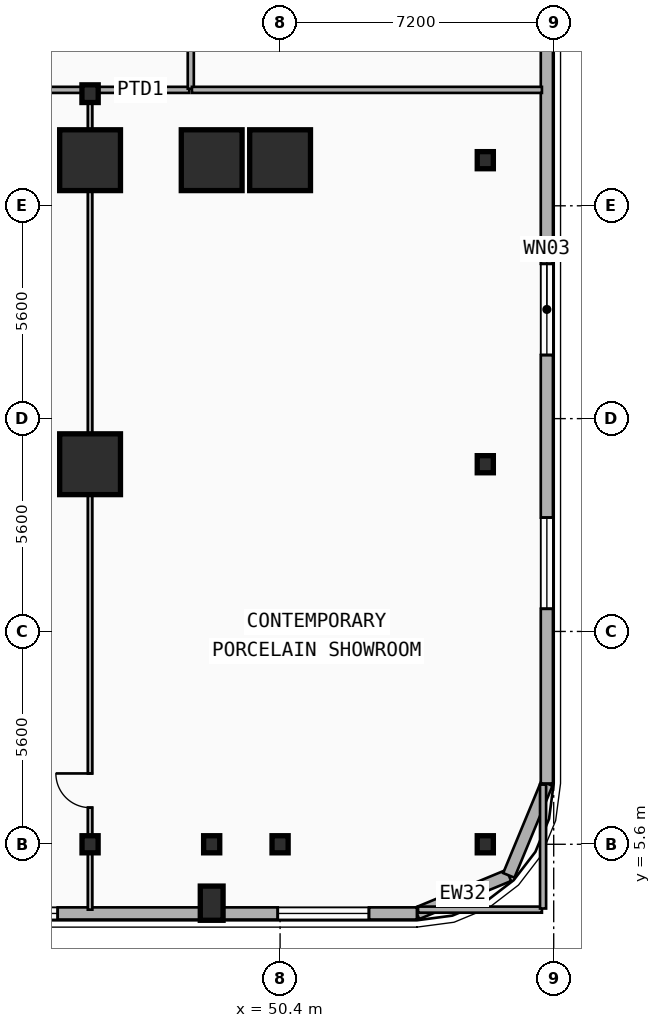
"""IFC4 building model, lengths in metres.
Left out: names, types, materials, properties, quantities, classifications, styles, units other than length and angle.
Written with IfcOpenShell. Run it as: python <this file> out.ifc"""

import sys

from ifc_helpers import new_model, si_unit, direction, frame, frame_2d, origin, origin_2d, place, context, subcontext, project, spatial, rectangle, i_section, extrude, element, fill, save


model = new_model("IFC4")
c1 = context("Model", 3, precision=1e-05, world=origin(), true_north=direction((0.0, 1.0)))
c2 = subcontext(c1, "Body", "Model", "MODEL_VIEW")
j1 = project(units=[si_unit("LENGTHUNIT", "METRE"), si_unit("PLANEANGLEUNIT", "RADIAN")], contexts=[c1])
p1 = place(None, origin())
s1 = spatial("IfcSite", under=j1, at=p1, CompositionType="ELEMENT")
p2 = place(p1, origin())
s2 = spatial("IfcBuilding", under=s1, at=p2, CompositionType="ELEMENT")
p3 = place(p2, frame((0.0, 0.0, 10.4)))
s3 = spatial("IfcBuildingStorey", under=s2, at=p3, CompositionType="ELEMENT", Elevation=10.4)
p4 = place(p3, frame((45.4, 25.35, 0.0), z_axis=(0.0, 0.0, 1.0), x_axis=(1.0, 0.0, 0.0)))
e1 = element("IfcColumn", 1, at=p4, inside=s3, PredefinedType="COLUMN", context=c2, shape_type="SweptSolid", body=[
    extrude(i_section(OverallWidth=0.428, OverallDepth=0.465, WebThickness=0.045, FlangeThickness=0.073, FilletRadius=0.015, at=origin_2d()), origin(), (0.0, 0.0, 1.0), 4.5),
])
p5 = place(p3, frame((45.4, 5.6, 0.0), z_axis=(0.0, 0.0, 1.0), x_axis=(1.0, 0.0, 0.0)))
e2 = element("IfcColumn", 2, at=p5, inside=s3, PredefinedType="COLUMN", context=c2, shape_type="SweptSolid", body=[
    extrude(i_section(OverallWidth=0.424, OverallDepth=0.45, WebThickness=0.041, FlangeThickness=0.065, FilletRadius=0.015, at=origin_2d()), origin(), (0.0, 0.0, 1.0), 4.5),
])
for number, where, z_axis, x_axis in (
    (3, (45.4, 15.6, 0.0), (0.0, 0.0, 1.0), (1.0, 0.0, 0.0)),
    (4, (45.4, 23.6, 0.0), (0.0, 0.0, 1.0), (1.0, 0.0, 0.0)),
):
    element("IfcColumn", number, at=place(p3, frame(where, z_axis=z_axis, x_axis=x_axis)), inside=s3, PredefinedType="COLUMN", context=c2, shape_type="SweptSolid", body=[
        extrude(rectangle(XDim=1.6, YDim=1.6, at=origin_2d()), origin(), (0.0, 0.0, 1.0), 4.5),
    ])
p6 = place(p3, frame((48.6, 5.6, 0.0), z_axis=(0.0, 0.0, 1.0), x_axis=(1.0, 0.0, 0.0)))
e5 = element("IfcColumn", 5, at=p6, inside=s3, PredefinedType="COLUMN", context=c2, shape_type="SweptSolid", body=[
    extrude(i_section(OverallWidth=0.424, OverallDepth=0.45, WebThickness=0.041, FlangeThickness=0.065, FilletRadius=0.015, at=origin_2d()), origin(), (0.0, 0.0, 1.0), 4.5),
])
p7 = place(p3, frame((48.6, 23.6, 0.0), z_axis=(0.0, 0.0, 1.0), x_axis=(1.0, 0.0, 0.0)))
e6 = element("IfcColumn", 6, at=p7, inside=s3, PredefinedType="COLUMN", context=c2, shape_type="SweptSolid", body=[
    extrude(rectangle(XDim=1.6, YDim=1.6, at=origin_2d()), origin(), (0.0, 0.0, 1.0), 4.5),
])
p8 = place(p3, frame((50.4, 5.6, 0.0), z_axis=(0.0, 0.0, 1.0), x_axis=(1.0, 0.0, 0.0)))
e7 = element("IfcColumn", 7, at=p8, inside=s3, PredefinedType="COLUMN", context=c2, shape_type="SweptSolid", body=[
    extrude(i_section(OverallWidth=0.424, OverallDepth=0.45, WebThickness=0.041, FlangeThickness=0.065, FilletRadius=0.015, at=origin_2d()), origin(), (0.0, 0.0, 1.0), 4.5),
])
p9 = place(p3, frame((50.4, 23.6, 0.0), z_axis=(0.0, 0.0, 1.0), x_axis=(1.0, 0.0, 0.0)))
e8 = element("IfcColumn", 8, at=p9, inside=s3, PredefinedType="COLUMN", context=c2, shape_type="SweptSolid", body=[
    extrude(rectangle(XDim=1.6, YDim=1.6, at=origin_2d()), origin(), (0.0, 0.0, 1.0), 4.5),
])
for number, where, z_axis, x_axis in (
    (9, (55.8, 5.6, 0.0), (0.0, 0.0, 1.0), (1.0, 0.0, 0.0)),
    (10, (55.8, 15.6, 0.0), (0.0, 0.0, 1.0), (1.0, 0.0, 0.0)),
    (11, (55.8, 23.6, 0.0), (0.0, 0.0, 1.0), (1.0, 0.0, 0.0)),
):
    element("IfcColumn", number, at=place(p3, frame(where, z_axis=z_axis, x_axis=x_axis)), inside=s3, PredefinedType="COLUMN", context=c2, shape_type="SweptSolid", body=[
        extrude(i_section(OverallWidth=0.424, OverallDepth=0.45, WebThickness=0.041, FlangeThickness=0.065, FilletRadius=0.015, at=origin_2d()), origin(), (0.0, 0.0, 1.0), 4.5),
    ])
p10 = place(p3, frame((48.6, 4.05, 0.0), z_axis=(0.0, 0.0, 1.0), x_axis=(1.0, 0.0, 0.0)))
e12 = element("IfcColumn", 12, at=p10, inside=s3, PredefinedType="PILASTER", context=c2, shape_type="SweptSolid", body=[
    extrude(rectangle(XDim=0.6, YDim=0.9, at=origin_2d()), origin(), (0.0, 0.0, 1.0), 4.5),
])
for number, where, z_axis, x_axis in (
    (13, (56.418, 4.782, 0.0), (0.0, 0.0, 1.0), (-0.924, -0.383, 0.0)),
    (14, (57.42, 7.2, 0.0), (0.0, 0.0, 1.0), (-0.383, -0.924, 0.0)),
):
    element("IfcWall", number, at=place(p3, frame(where, z_axis=z_axis, x_axis=x_axis)), inside=s3, PredefinedType="SOLIDWALL", context=c2, shape_type="SweptSolid", body=[
        extrude(rectangle(XDim=2.617, YDim=0.32, at=frame_2d((1.309, 0.0))), origin(), (0.0, 0.0, 1.0), 4.2),
    ])
p11 = place(p3, frame((57.42, 41.6, 0.0), z_axis=(0.0, 0.0, 1.0), x_axis=(0.0, -1.0, 0.0)))
e15 = element("IfcWall", 15, at=p11, inside=s3, PredefinedType="SOLIDWALL", context=c2, shape_type="SweptSolid", body=[
    extrude(rectangle(XDim=34.4, YDim=0.32, at=frame_2d((17.2, 0.0))), origin(), (0.0, 0.0, 1.0), 4.2),
])
p12 = place(p11, frame((20.727, 0.0, 0.9)))
e16 = element("IfcOpeningElement", 16, at=p12, cuts=e15, PredefinedType="OPENING", context=c2, shape_type="SweptSolid", body=[
    extrude(rectangle(XDim=2.4, YDim=1.8, at=frame_2d((1.2, 0.9))), frame((0.0, 0.17, 0.0), z_axis=(0.0, -1.0, 0.0), x_axis=(1.0, 0.0, 0.0)), (0.0, 0.0, 1.0), 0.34),
])
p13 = place(p11, frame((27.403, 0.0, 0.9)))
e17 = element("IfcOpeningElement", 17, at=p13, cuts=e15, PredefinedType="OPENING", context=c2, shape_type="SweptSolid", body=[
    extrude(rectangle(XDim=2.4, YDim=1.8, at=frame_2d((1.2, 0.9))), frame((0.0, 0.17, 0.0), z_axis=(0.0, -1.0, 0.0), x_axis=(1.0, 0.0, 0.0)), (0.0, 0.0, 1.0), 0.34),
])
p14 = place(p3, frame((54.0, 3.78, 0.0), z_axis=(0.0, 0.0, 1.0), x_axis=(-1.0, 0.0, 0.0)))
e18 = element("IfcWall", 18, at=p14, inside=s3, PredefinedType="SOLIDWALL", context=c2, shape_type="SweptSolid", body=[
    extrude(rectangle(XDim=16.95, YDim=0.32, at=frame_2d((8.475, 0.0))), origin(), (0.0, 0.0, 1.0), 4.2),
])
p15 = place(p14, frame((9.452, 0.0, 0.9)))
e19 = element("IfcOpeningElement", 19, at=p15, cuts=e18, PredefinedType="OPENING", context=c2, shape_type="SweptSolid", body=[
    extrude(rectangle(XDim=2.4, YDim=1.8, at=frame_2d((1.2, 0.9))), frame((0.0, 0.17, 0.0), z_axis=(0.0, -1.0, 0.0), x_axis=(1.0, 0.0, 0.0)), (0.0, 0.0, 1.0), 0.34),
])
p16 = place(p14, frame((1.262, 0.0, 0.9)))
e20 = element("IfcOpeningElement", 20, at=p16, cuts=e18, PredefinedType="OPENING", context=c2, shape_type="SweptSolid", body=[
    extrude(rectangle(XDim=2.4, YDim=1.8, at=frame_2d((1.2, 0.9))), frame((0.0, 0.17, 0.0), z_axis=(0.0, -1.0, 0.0), x_axis=(1.0, 0.0, 0.0)), (0.0, 0.0, 1.0), 0.34),
])
p17 = place(p3, frame((36.39, 25.45, 0.0), z_axis=(0.0, 0.0, 1.0), x_axis=(1.0, 0.0, 0.0)))
e21 = element("IfcWall", 21, at=p17, inside=s3, PredefinedType="PARTITIONING", context=c2, shape_type="SweptSolid", body=[
    extrude(rectangle(XDim=8.97, YDim=0.16, at=frame_2d((4.485, 0.0))), origin(), (0.0, 0.0, 1.0), 3.366),
])
p18 = place(p17, frame((3.985, 0.0, 0.0)))
e22 = element("IfcOpeningElement", 22, at=p18, cuts=e21, PredefinedType="OPENING", context=c2, shape_type="SweptSolid", body=[
    extrude(rectangle(XDim=1.0, YDim=2.15, at=frame_2d((0.5, 1.075))), frame((0.0, 0.09, 0.0), z_axis=(0.0, -1.0, 0.0), x_axis=(1.0, 0.0, 0.0)), (0.0, 0.0, 1.0), 0.18),
])
p19 = place(p3, frame((45.44, 25.45, 0.0), z_axis=(0.0, 0.0, 1.0), x_axis=(1.0, 0.0, 0.0)))
e23 = element("IfcWall", 23, at=p19, inside=s3, PredefinedType="PARTITIONING", context=c2, shape_type="SweptSolid", body=[
    extrude(rectangle(XDim=2.57, YDim=0.16, at=frame_2d((1.285, 0.0))), origin(), (0.0, 0.0, 1.0), 3.366),
])
p20 = place(p3, frame((45.4, 3.88, 0.0), z_axis=(0.0, 0.0, 1.0), x_axis=(0.0, 1.0, 0.0)))
e24 = element("IfcWall", 24, at=p20, inside=s3, PredefinedType="PARTITIONING", context=c2, shape_type="SweptSolid", body=[
    extrude(rectangle(XDim=21.53, YDim=0.12, at=frame_2d((10.765, 0.0))), origin(), (0.0, 0.0, 1.0), 3.172),
])
p21 = place(p20, frame((2.684, 0.0, 0.0)))
e25 = element("IfcOpeningElement", 25, at=p21, cuts=e24, PredefinedType="OPENING", context=c2, shape_type="SweptSolid", body=[
    extrude(rectangle(XDim=0.9, YDim=2.1, at=frame_2d((0.45, 1.05))), frame((0.0, 0.07, 0.0), z_axis=(0.0, -1.0, 0.0), x_axis=(1.0, 0.0, 0.0)), (0.0, 0.0, 1.0), 0.14),
])
p22 = place(p3, frame((48.05, 25.48, 0.0), z_axis=(0.0, 0.0, 1.0), x_axis=(0.0, 1.0, 0.0)))
e26 = element("IfcWall", 26, at=p22, inside=s3, PredefinedType="PARTITIONING", context=c2, shape_type="SweptSolid", body=[
    extrude(rectangle(XDim=2.09, YDim=0.16, at=frame_2d((1.045, 0.0))), origin(), (0.0, 0.0, 1.0), 4.2),
])
p23 = place(p3, frame((54.03, 3.88, 0.0), z_axis=(0.0, 0.0, 1.0), x_axis=(1.0, 0.0, 0.0)))
e27 = element("IfcWall", 27, at=p23, inside=s3, PredefinedType="PARTITIONING", context=c2, shape_type="SweptSolid", body=[
    extrude(rectangle(XDim=3.26, YDim=0.16, at=frame_2d((1.63, 0.0))), origin(), (0.0, 0.0, 1.0), 4.2),
])
p24 = place(p3, frame((48.08, 25.45, 0.0), z_axis=(0.0, 0.0, 1.0), x_axis=(1.0, 0.0, 0.0)))
e28 = element("IfcWall", 28, at=p24, inside=s3, PredefinedType="PARTITIONING", context=c2, shape_type="SweptSolid", body=[
    extrude(rectangle(XDim=9.21, YDim=0.16, at=frame_2d((4.605, 0.0))), origin(), (0.0, 0.0, 1.0), 4.2),
])
p25 = place(p3, frame((57.32, 3.91, 0.0), z_axis=(0.0, 0.0, 1.0), x_axis=(0.0, 1.0, 0.0)))
e29 = element("IfcWall", 29, at=p25, inside=s3, PredefinedType="PARTITIONING", context=c2, shape_type="SweptSolid", body=[
    extrude(rectangle(XDim=3.26, YDim=0.16, at=frame_2d((1.63, 0.0))), origin(), (0.0, 0.0, 1.0), 4.2),
])
p26 = place(p12, origin())
e30 = element("IfcWindow", 30, at=p26, inside=s3, PartitioningType="SINGLE_PANEL", PredefinedType="WINDOW", context=c2, shape_type="SweptSolid", body=[
    extrude(rectangle(XDim=2.4, YDim=1.8, at=frame_2d((1.2, 0.9))), frame((0.0, 0.03, 0.0), z_axis=(0.0, -1.0, 0.0), x_axis=(1.0, 0.0, 0.0)), (0.0, 0.0, 1.0), 0.06),
])
fill(e16, e30)
p27 = place(p13, origin())
e31 = element("IfcWindow", 31, at=p27, inside=s3, PartitioningType="SINGLE_PANEL", PredefinedType="WINDOW", context=c2, shape_type="SweptSolid", body=[
    extrude(rectangle(XDim=2.4, YDim=1.8, at=frame_2d((1.2, 0.9))), frame((0.0, 0.03, 0.0), z_axis=(0.0, -1.0, 0.0), x_axis=(1.0, 0.0, 0.0)), (0.0, 0.0, 1.0), 0.06),
])
fill(e17, e31)
p28 = place(p15, origin())
e32 = element("IfcWindow", 32, at=p28, inside=s3, PartitioningType="SINGLE_PANEL", PredefinedType="WINDOW", context=c2, shape_type="SweptSolid", body=[
    extrude(rectangle(XDim=2.4, YDim=1.8, at=frame_2d((1.2, 0.9))), frame((0.0, 0.03, 0.0), z_axis=(0.0, -1.0, 0.0), x_axis=(1.0, 0.0, 0.0)), (0.0, 0.0, 1.0), 0.06),
])
fill(e19, e32)
p29 = place(p16, origin())
e33 = element("IfcWindow", 33, at=p29, inside=s3, PartitioningType="SINGLE_PANEL", PredefinedType="WINDOW", context=c2, shape_type="SweptSolid", body=[
    extrude(rectangle(XDim=2.4, YDim=1.8, at=frame_2d((1.2, 0.9))), frame((0.0, 0.03, 0.0), z_axis=(0.0, -1.0, 0.0), x_axis=(1.0, 0.0, 0.0)), (0.0, 0.0, 1.0), 0.06),
])
fill(e20, e33)
p30 = place(p21, origin())
e34 = element("IfcDoor", 34, at=p30, inside=s3, OperationType="SINGLE_SWING_RIGHT", PredefinedType="DOOR", context=c2, shape_type="SweptSolid", body=[
    extrude(rectangle(XDim=0.9, YDim=2.1, at=frame_2d((0.45, 1.05))), frame((0.0, 0.025, 0.0), z_axis=(0.0, -1.0, 0.0), x_axis=(1.0, 0.0, 0.0)), (0.0, 0.0, 1.0), 0.05),
])
fill(e25, e34)
save(model, sys.argv[1])
